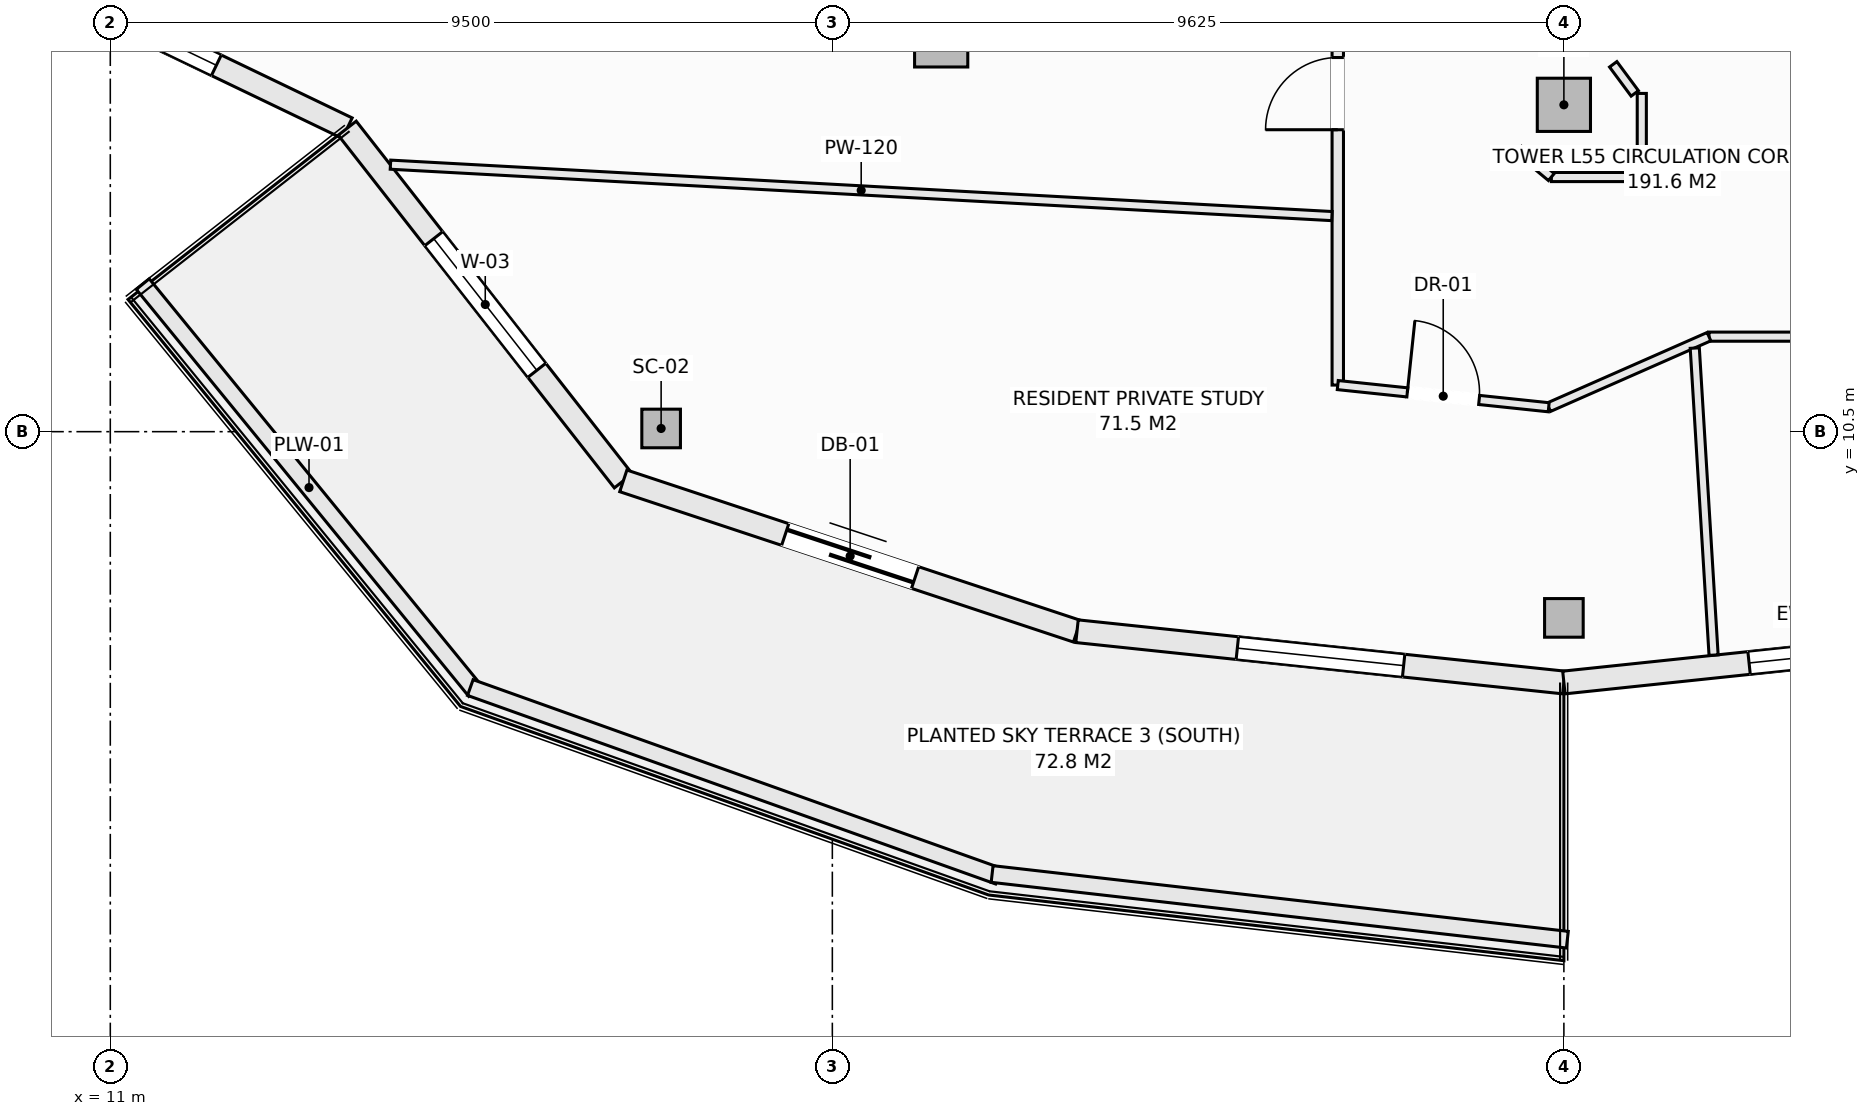
"""IFC4 building model, lengths in metres.
Left out: names, types, materials, properties, quantities, classifications, styles, units other than length and angle.
Written with IfcOpenShell. Run it as: python <this file> out.ifc"""

import sys

from ifc_helpers import new_model, si_unit, direction, frame, frame_2d, origin, origin_2d, place, context, subcontext, project, spatial, rectangle, hollow_rectangle, extrude, element, fill, save


model = new_model("IFC4")
c1 = context("Model", 3, precision=1e-05, world=origin(), true_north=direction((0.0, 1.0)))
c2 = subcontext(c1, "Body", "Model", "MODEL_VIEW")
j1 = project(units=[si_unit("LENGTHUNIT", "METRE"), si_unit("PLANEANGLEUNIT", "RADIAN")], contexts=[c1])
p1 = place(None, origin())
s1 = spatial("IfcSite", under=j1, at=p1, CompositionType="ELEMENT")
p2 = place(p1, origin())
s2 = spatial("IfcBuilding", under=s1, at=p2, CompositionType="ELEMENT")
p3 = place(p2, frame((0.0, 0.0, 209.6)))
s3 = spatial("IfcBuildingStorey", under=s2, at=p3, CompositionType="ELEMENT", Elevation=209.6)
for number, where, z_axis, x_axis in (
    (1, (18.247, 10.542, -0.27), (0.0, 0.0, 1.0), (1.0, 0.0, 0.0)),
    (2, (30.125, 8.05, -0.27), (0.0, 0.0, 1.0), (1.0, 0.0, 0.0)),
):
    element("IfcColumn", number, at=place(p3, frame(where, z_axis=z_axis, x_axis=x_axis)), inside=s3, PredefinedType="COLUMN", context=c2, shape_type="SweptSolid", body=[
        extrude(hollow_rectangle(XDim=0.508, YDim=0.508, WallThickness=0.019, at=origin_2d()), origin(), (0.0, 0.0, 1.0), 3.3),
    ])
for number, where, z_axis, x_axis in (
    (3, (21.932, 15.648, -0.27), (0.0, 0.0, 1.0), (1.0, 0.0, 0.0)),
    (4, (30.125, 14.8, -0.27), (0.0, 0.0, 1.0), (1.0, 0.0, 0.0)),
):
    element("IfcColumn", number, at=place(p3, frame(where, z_axis=z_axis, x_axis=x_axis)), inside=s3, PredefinedType="COLUMN", context=c2, shape_type="SweptSolid", body=[
        extrude(rectangle(XDim=0.7, YDim=0.7, at=origin_2d()), origin(), (0.0, 0.0, 1.0), 3.3),
    ])
p4 = place(p3, frame((8.691, 17.1, 0.0), z_axis=(0.0, 0.0, 1.0), x_axis=(0.901348331142, -0.433094892545, 0.0)))
e5 = element("IfcWall", 5, at=p4, inside=s3, PredefinedType="SOLIDWALL", context=c2, shape_type="SweptSolid", body=[
    extrude(rectangle(XDim=6.021, YDim=0.3, at=frame_2d((3.01, 0.0))), origin(), (0.0, 0.0, 1.0), 2.605),
])
p5 = place(p4, frame((1.91, 0.0, 0.72)))
e6 = element("IfcOpeningElement", 6, at=p5, cuts=e5, PredefinedType="OPENING", context=c2, shape_type="SweptSolid", body=[
    extrude(rectangle(XDim=2.2, YDim=1.65, at=frame_2d((1.1, 0.825))), frame((0.0, 0.16, 0.0), z_axis=(0.0, -1.0, 0.0), x_axis=(1.0, 0.0, 0.0)), (0.0, 0.0, 1.0), 0.32),
])
p6 = place(p3, frame((14.117, 14.493, 0.0), z_axis=(0.0, 0.0, 1.0), x_axis=(0.616450126935, -0.787393955401, 0.0)))
e7 = element("IfcWall", 7, at=p6, inside=s3, PredefinedType="SOLIDWALL", context=c2, shape_type="SweptSolid", body=[
    extrude(rectangle(XDim=5.893, YDim=0.3, at=frame_2d((2.946, 0.0))), origin(), (0.0, 0.0, 1.0), 2.605),
])
p7 = place(p6, frame((1.846, 0.0, 0.72)))
e8 = element("IfcOpeningElement", 8, at=p7, cuts=e7, PredefinedType="OPENING", context=c2, shape_type="SweptSolid", body=[
    extrude(rectangle(XDim=2.2, YDim=1.65, at=frame_2d((1.1, 0.825))), frame((0.0, 0.16, 0.0), z_axis=(0.0, -1.0, 0.0), x_axis=(1.0, 0.0, 0.0)), (0.0, 0.0, 1.0), 0.32),
])
p8 = place(p3, frame((17.75, 9.853, 0.0), z_axis=(0.0, 0.0, 1.0), x_axis=(0.949240877604, -0.314550085495, 0.0)))
e9 = element("IfcWall", 9, at=p8, inside=s3, PredefinedType="SOLIDWALL", context=c2, shape_type="SweptSolid", body=[
    extrude(rectangle(XDim=6.288, YDim=0.3, at=frame_2d((3.144, 0.0))), origin(), (0.0, 0.0, 1.0), 2.605),
])
p9 = place(p8, frame((2.244, 0.0, 0.0)))
e10 = element("IfcOpeningElement", 10, at=p9, cuts=e9, PredefinedType="OPENING", context=c2, shape_type="SweptSolid", body=[
    extrude(rectangle(XDim=1.8, YDim=2.25, at=frame_2d((0.9, 1.125))), frame((0.0, 0.16, 0.0), z_axis=(0.0, -1.0, 0.0), x_axis=(1.0, 0.0, 0.0)), (0.0, 0.0, 1.0), 0.32),
])
p10 = place(p3, frame((23.719, 7.875, 0.0), z_axis=(0.0, 0.0, 1.0), x_axis=(0.994497142298, -0.104763705363, 0.0)))
e11 = element("IfcWall", 11, at=p10, inside=s3, PredefinedType="SOLIDWALL", context=c2, shape_type="SweptSolid", body=[
    extrude(rectangle(XDim=6.441, YDim=0.3, at=frame_2d((3.221, 0.0))), origin(), (0.0, 0.0, 1.0), 2.605),
])
p11 = place(p10, frame((2.121, 0.0, 0.72)))
e12 = element("IfcOpeningElement", 12, at=p11, cuts=e11, PredefinedType="OPENING", context=c2, shape_type="SweptSolid", body=[
    extrude(rectangle(XDim=2.2, YDim=1.65, at=frame_2d((1.1, 0.825))), frame((0.0, 0.16, 0.0), z_axis=(0.0, -1.0, 0.0), x_axis=(1.0, 0.0, 0.0)), (0.0, 0.0, 1.0), 0.32),
])
p12 = place(p3, frame((30.125, 7.2, 0.0), z_axis=(0.0, 0.0, 1.0), x_axis=(0.994497142298, 0.104763705363, 0.0)))
e13 = element("IfcWall", 13, at=p12, inside=s3, PredefinedType="SOLIDWALL", context=c2, shape_type="SweptSolid", body=[
    extrude(rectangle(XDim=6.441, YDim=0.3, at=frame_2d((3.221, 0.0))), origin(), (0.0, 0.0, 1.0), 2.605),
])
p13 = place(p12, frame((2.45, 0.0, 0.72)))
e14 = element("IfcOpeningElement", 14, at=p13, cuts=e13, PredefinedType="OPENING", context=c2, shape_type="SweptSolid", body=[
    extrude(rectangle(XDim=2.2, YDim=1.65, at=frame_2d((1.1, 0.825))), frame((0.0, 0.16, 0.0), z_axis=(0.0, -1.0, 0.0), x_axis=(1.0, 0.0, 0.0)), (0.0, 0.0, 1.0), 0.32),
])
p14 = place(p3, frame((11.427, 12.441, 0.0), z_axis=(0.0, 0.0, 1.0), x_axis=(0.632697312147, -0.774399193699, 0.0)))
e15 = element("IfcWall", 15, at=p14, inside=s3, PredefinedType="PARAPET", context=c2, shape_type="SweptSolid", body=[
    extrude(rectangle(XDim=6.914, YDim=0.22, at=frame_2d((3.457, 0.0))), origin(), (0.0, 0.0, 1.0), 0.52),
])
p15 = place(p3, frame((15.737, 7.134, 0.0), z_axis=(0.0, 0.0, 1.0), x_axis=(0.941780086523, -0.336229488042, 0.0)))
e16 = element("IfcWall", 16, at=p15, inside=s3, PredefinedType="PARAPET", context=c2, shape_type="SweptSolid", body=[
    extrude(rectangle(XDim=7.378, YDim=0.22, at=frame_2d((3.689, 0.0))), origin(), (0.0, 0.0, 1.0), 0.52),
])
p16 = place(p3, frame((22.602, 4.68, 0.0), z_axis=(0.0, 0.0, 1.0), x_axis=(0.993546198781, -0.113428175021, 0.0)))
e17 = element("IfcWall", 17, at=p16, inside=s3, PredefinedType="PARAPET", context=c2, shape_type="SweptSolid", body=[
    extrude(rectangle(XDim=7.617, YDim=0.22, at=frame_2d((3.809, 0.0))), origin(), (0.0, 0.0, 1.0), 0.52),
])
p17 = place(p3, frame((27.15, 11.113, 0.0), z_axis=(0.0, 0.0, 1.0), x_axis=(0.0, 1.0, 0.0)))
e18 = element("IfcWall", 18, at=p17, inside=s3, PredefinedType="PARTITIONING", context=c2, shape_type="SweptSolid", body=[
    extrude(rectangle(XDim=5.86, YDim=0.15, at=frame_2d((2.93, 0.0))), origin(), (0.0, 0.0, 1.0), 3.03),
])
p18 = place(p17, frame((3.359, 0.0, 0.0)))
e19 = element("IfcOpeningElement", 19, at=p18, cuts=e18, PredefinedType="OPENING", context=c2, shape_type="SweptSolid", body=[
    extrude(rectangle(XDim=0.95, YDim=2.1, at=frame_2d((0.475, 1.05))), frame((0.0, 0.085, 0.0), z_axis=(0.0, -1.0, 0.0), x_axis=(1.0, 0.0, 0.0)), (0.0, 0.0, 1.0), 0.17),
])
p19 = place(p3, frame((32.034, 11.75, 0.0), z_axis=(0.0, 0.0, 1.0), x_axis=(1.0, 0.0, 0.0)))
e20 = element("IfcWall", 20, at=p19, inside=s3, PredefinedType="PARTITIONING", context=c2, shape_type="SweptSolid", body=[
    extrude(rectangle(XDim=3.854, YDim=0.12, at=frame_2d((1.927, 0.0))), origin(), (0.0, 0.0, 1.0), 3.03),
])
p20 = place(p3, frame((29.925, 10.821, 0.0), z_axis=(0.0, 0.0, 1.0), x_axis=(0.915147800009, 0.403118474072, 0.0)))
e21 = element("IfcWall", 21, at=p20, inside=s3, PredefinedType="PARTITIONING", context=c2, shape_type="SweptSolid", body=[
    extrude(rectangle(XDim=2.304, YDim=0.12, at=frame_2d((1.152, 0.0))), origin(), (0.0, 0.0, 1.0), 3.03),
])
p21 = place(p3, frame((27.15, 11.113, 0.0), z_axis=(0.0, 0.0, 1.0), x_axis=(0.994510245906, -0.104639241146, 0.0)))
e22 = element("IfcWall", 22, at=p21, inside=s3, PredefinedType="PARTITIONING", context=c2, shape_type="SweptSolid", body=[
    extrude(rectangle(XDim=2.791, YDim=0.12, at=frame_2d((1.395, 0.0))), origin(), (0.0, 0.0, 1.0), 3.03),
])
p22 = place(p21, frame((0.92, 0.0, 0.0)))
e23 = element("IfcOpeningElement", 23, at=p22, cuts=e22, PredefinedType="OPENING", context=c2, shape_type="SweptSolid", body=[
    extrude(rectangle(XDim=0.95, YDim=2.1, at=frame_2d((0.475, 1.05))), frame((0.0, 0.07, 0.0), z_axis=(0.0, -1.0, 0.0), x_axis=(1.0, 0.0, 0.0)), (0.0, 0.0, 1.0), 0.14),
])
p23 = place(p3, frame((29.96, 13.85, 0.0), z_axis=(0.0, 0.0, 1.0), x_axis=(1.0, 0.0, 0.0)))
e24 = element("IfcWall", 24, at=p23, inside=s3, PredefinedType="PARTITIONING", context=c2, shape_type="SweptSolid", body=[
    extrude(rectangle(XDim=1.19, YDim=0.12, at=frame_2d((0.595, 0.0))), origin(), (0.0, 0.0, 1.0), 3.03),
])
p24 = place(p3, frame((31.15, 13.912, 0.0), z_axis=(0.0, 0.0, 1.0), x_axis=(0.0, 1.0, 0.0)))
e25 = element("IfcWall", 25, at=p24, inside=s3, PredefinedType="PARTITIONING", context=c2, shape_type="SweptSolid", body=[
    extrude(rectangle(XDim=1.038, YDim=0.12, at=frame_2d((0.519, 0.0))), origin(), (0.0, 0.0, 1.0), 3.03),
])
p25 = place(p3, frame((30.774, 15.333, 0.0), z_axis=(0.0, 0.0, 1.0), x_axis=(0.595814974861, -0.803121731577, 0.0)))
e26 = element("IfcWall", 26, at=p25, inside=s3, PredefinedType="PARTITIONING", context=c2, shape_type="SweptSolid", body=[
    extrude(rectangle(XDim=0.477, YDim=0.12, at=frame_2d((0.239, 0.0))), origin(), (0.0, 0.0, 1.0), 3.03),
])
p26 = place(p3, frame((29.531, 14.206, 0.0), z_axis=(0.0, 0.0, 1.0), x_axis=(0.7695479554, -0.638589026166, 0.0)))
e27 = element("IfcWall", 27, at=p26, inside=s3, PredefinedType="PARTITIONING", context=c2, shape_type="SweptSolid", body=[
    extrude(rectangle(XDim=0.557, YDim=0.12, at=frame_2d((0.279, 0.0))), origin(), (0.0, 0.0, 1.0), 3.03),
])
p27 = place(p3, frame((14.686, 14.013, 0.0), z_axis=(0.0, 0.0, 1.0), x_axis=(0.998511871839, -0.054534776034, 0.0)))
e28 = element("IfcWall", 28, at=p27, inside=s3, PredefinedType="PARTITIONING", context=c2, shape_type="SweptSolid", body=[
    extrude(rectangle(XDim=12.405, YDim=0.12, at=frame_2d((6.203, 0.0))), origin(), (0.0, 0.0, 1.0), 3.03),
])
p28 = place(p3, frame((31.847, 11.6, 0.0), z_axis=(0.0, 0.0, 1.0), x_axis=(0.061108836762, -0.998131108657, 0.0)))
e29 = element("IfcWall", 29, at=p28, inside=s3, PredefinedType="PARTITIONING", context=c2, shape_type="SweptSolid", body=[
    extrude(rectangle(XDim=4.047, YDim=0.12, at=frame_2d((2.023, 0.0))), origin(), (0.0, 0.0, 1.0), 3.03),
])
p29 = place(p5, origin())
e30 = element("IfcWindow", 30, at=p29, inside=s3, PartitioningType="SINGLE_PANEL", PredefinedType="WINDOW", context=c2, shape_type="SweptSolid", body=[
    extrude(rectangle(XDim=2.2, YDim=1.65, at=frame_2d((1.1, 0.825))), frame((0.0, 0.03, 0.0), z_axis=(0.0, -1.0, 0.0), x_axis=(1.0, 0.0, 0.0)), (0.0, 0.0, 1.0), 0.06),
])
fill(e6, e30)
p30 = place(p7, origin())
e31 = element("IfcWindow", 31, at=p30, inside=s3, PartitioningType="SINGLE_PANEL", PredefinedType="WINDOW", context=c2, shape_type="SweptSolid", body=[
    extrude(rectangle(XDim=2.2, YDim=1.65, at=frame_2d((1.1, 0.825))), frame((0.0, 0.03, 0.0), z_axis=(0.0, -1.0, 0.0), x_axis=(1.0, 0.0, 0.0)), (0.0, 0.0, 1.0), 0.06),
])
fill(e8, e31)
p31 = place(p9, frame((1.8, 0.0, 0.0), z_axis=(0.0, 0.0, 1.0), x_axis=(-1.0, 0.0, 0.0)))
e32 = element("IfcDoor", 32, at=p31, inside=s3, OperationType="SLIDING_TO_LEFT", PredefinedType="DOOR", context=c2, shape_type="SweptSolid", body=[
    extrude(rectangle(XDim=1.8, YDim=2.25, at=frame_2d((0.9, 1.125))), frame((0.0, 0.025, 0.0), z_axis=(0.0, -1.0, 0.0), x_axis=(1.0, 0.0, 0.0)), (0.0, 0.0, 1.0), 0.05),
])
fill(e10, e32)
p32 = place(p11, origin())
e33 = element("IfcWindow", 33, at=p32, inside=s3, PartitioningType="SINGLE_PANEL", PredefinedType="WINDOW", context=c2, shape_type="SweptSolid", body=[
    extrude(rectangle(XDim=2.2, YDim=1.65, at=frame_2d((1.1, 0.825))), frame((0.0, 0.03, 0.0), z_axis=(0.0, -1.0, 0.0), x_axis=(1.0, 0.0, 0.0)), (0.0, 0.0, 1.0), 0.06),
])
fill(e12, e33)
p33 = place(p13, origin())
e34 = element("IfcWindow", 34, at=p33, inside=s3, PartitioningType="SINGLE_PANEL", PredefinedType="WINDOW", context=c2, shape_type="SweptSolid", body=[
    extrude(rectangle(XDim=2.2, YDim=1.65, at=frame_2d((1.1, 0.825))), frame((0.0, 0.03, 0.0), z_axis=(0.0, -1.0, 0.0), x_axis=(1.0, 0.0, 0.0)), (0.0, 0.0, 1.0), 0.06),
])
fill(e14, e34)
p34 = place(p22, origin())
e35 = element("IfcDoor", 35, at=p34, inside=s3, OperationType="SINGLE_SWING_LEFT", PredefinedType="DOOR", context=c2, shape_type="SweptSolid", body=[
    extrude(rectangle(XDim=0.95, YDim=2.1, at=frame_2d((0.475, 1.05))), frame((0.0, 0.025, 0.0), z_axis=(0.0, -1.0, 0.0), x_axis=(1.0, 0.0, 0.0)), (0.0, 0.0, 1.0), 0.05),
])
fill(e23, e35)
p35 = place(p18, origin())
e36 = element("IfcDoor", 36, at=p35, inside=s3, OperationType="SINGLE_SWING_LEFT", PredefinedType="DOOR", context=c2, shape_type="SweptSolid", body=[
    extrude(rectangle(XDim=0.95, YDim=2.1, at=frame_2d((0.475, 1.05))), frame((0.0, 0.025, 0.0), z_axis=(0.0, -1.0, 0.0), x_axis=(1.0, 0.0, 0.0)), (0.0, 0.0, 1.0), 0.05),
])
fill(e19, e36)
save(model, sys.argv[1])
